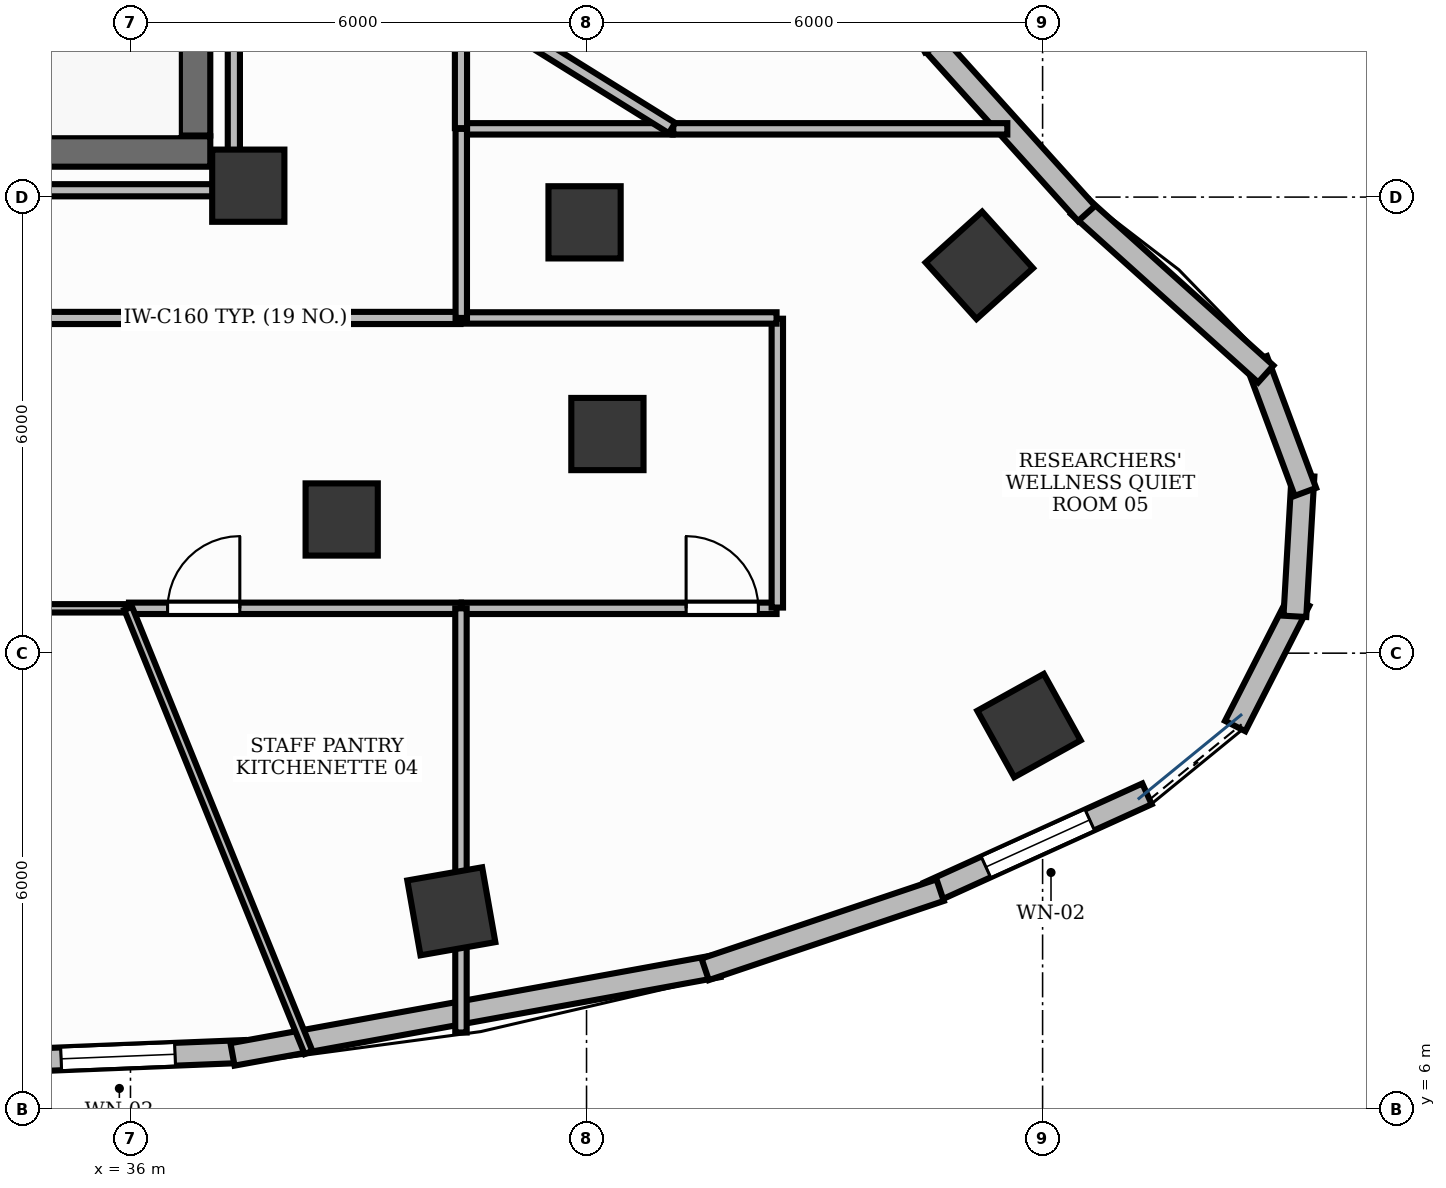
"""IFC4 building model, lengths in metres.
Left out: names, types, materials, properties, quantities, classifications, styles, units other than length and angle.
Written with IfcOpenShell. Run it as: python <this file> out.ifc"""

import sys

from ifc_helpers import new_model, si_unit, direction, frame, frame_2d, origin, origin_2d, place, context, subcontext, project, spatial, rectangle, extrude, element, fill, save


model = new_model("IFC4")
c1 = context("Model", 3, precision=1e-05, world=origin(), true_north=direction((0.0, 1.0)))
c2 = subcontext(c1, "Body", "Model", "MODEL_VIEW")
j1 = project(units=[si_unit("LENGTHUNIT", "METRE"), si_unit("PLANEANGLEUNIT", "RADIAN")], contexts=[c1])
p1 = place(None, origin())
s1 = spatial("IfcSite", under=j1, at=p1, CompositionType="ELEMENT")
p2 = place(p1, origin())
s2 = spatial("IfcBuilding", under=s1, at=p2, CompositionType="ELEMENT")
p3 = place(p2, frame((0.0, 0.0, 192.0)))
s3 = spatial("IfcBuildingStorey", under=s2, at=p3, CompositionType="ELEMENT", Elevation=192.0)
p4 = place(p3, frame((28.852, 18.6, 0.0), z_axis=(0.0, 0.0, 1.0), x_axis=(1.0, 0.0, 0.0)))
e1 = element("IfcWall", 1, at=p4, inside=s3, PredefinedType="SHEAR", context=c2, shape_type="SweptSolid", body=[
    extrude(rectangle(XDim=8.198, YDim=0.4, at=frame_2d((4.099, 0.0))), origin(), (0.0, 0.0, 1.0), 3.9),
])
p5 = place(p3, frame((36.85, 18.81, 0.0), z_axis=(0.0, 0.0, 1.0), x_axis=(0.0, 1.0, 0.0)))
e2 = element("IfcWall", 2, at=p5, inside=s3, PredefinedType="SHEAR", context=c2, shape_type="SweptSolid", body=[
    extrude(rectangle(XDim=3.08, YDim=0.4, at=frame_2d((1.54, 0.0))), origin(), (0.0, 0.0, 1.0), 3.9),
])
p6 = place(p3, frame((37.55, 18.15, -0.0), z_axis=(0.0, 0.0, 1.0), x_axis=(1.0, 0.0, 0.0)))
e3 = element("IfcColumn", 3, at=p6, inside=s3, PredefinedType="PILASTER", context=c2, shape_type="SweptSolid", body=[
    extrude(rectangle(XDim=0.95, YDim=0.95, at=origin_2d()), origin(), (0.0, 0.0, 1.0), 3.901),
])
p7 = place(p3, frame((40.221, 8.604, -0.0), z_axis=(0.0, 0.0, 1.0), x_axis=(0.984868307662, 0.173304404339, 0.0)))
e4 = element("IfcColumn", 4, at=p7, inside=s3, PredefinedType="COLUMN", context=c2, shape_type="SweptSolid", body=[
    extrude(rectangle(XDim=1.0, YDim=1.0, at=origin_2d()), origin(), (0.0, 0.0, 1.0), 3.901),
])
p8 = place(p3, frame((38.779, 13.759, -0.0), z_axis=(0.0, 0.0, 1.0), x_axis=(1.0, 0.0, 0.0)))
e5 = element("IfcColumn", 5, at=p8, inside=s3, PredefinedType="COLUMN", context=c2, shape_type="SweptSolid", body=[
    extrude(rectangle(XDim=0.95, YDim=0.95, at=origin_2d()), origin(), (0.0, 0.0, 1.0), 3.901),
])
p9 = place(p3, frame((47.821, 11.047, -0.0), z_axis=(0.0, 0.0, 1.0), x_axis=(0.874535078577, 0.484962262797, 0.0)))
e6 = element("IfcColumn", 6, at=p9, inside=s3, PredefinedType="COLUMN", context=c2, shape_type="SweptSolid", body=[
    extrude(rectangle(XDim=1.0, YDim=1.0, at=origin_2d()), origin(), (0.0, 0.0, 1.0), 3.901),
])
p10 = place(p3, frame((42.275, 14.883, -0.0), z_axis=(0.0, 0.0, 1.0), x_axis=(1.0, 0.0, 0.0)))
e7 = element("IfcColumn", 7, at=p10, inside=s3, PredefinedType="COLUMN", context=c2, shape_type="SweptSolid", body=[
    extrude(rectangle(XDim=0.95, YDim=0.95, at=origin_2d()), origin(), (0.0, 0.0, 1.0), 3.901),
])
p11 = place(p3, frame((47.167, 17.102, -0.0), z_axis=(0.0, 0.0, 1.0), x_axis=(-0.669130606359, 0.743144825477, 0.0)))
e8 = element("IfcColumn", 8, at=p11, inside=s3, PredefinedType="COLUMN", context=c2, shape_type="SweptSolid", body=[
    extrude(rectangle(XDim=1.0, YDim=1.0, at=origin_2d()), origin(), (0.0, 0.0, 1.0), 3.901),
])
p12 = place(p3, frame((41.974, 17.668, -0.0), z_axis=(0.0, 0.0, 1.0), x_axis=(1.0, 0.0, 0.0)))
e9 = element("IfcColumn", 9, at=p12, inside=s3, PredefinedType="COLUMN", context=c2, shape_type="SweptSolid", body=[
    extrude(rectangle(XDim=0.95, YDim=0.95, at=origin_2d()), origin(), (0.0, 0.0, 1.0), 3.901),
])
p13 = place(p3, frame((34.174, 6.626, 0.0), z_axis=(0.0, 0.0, 1.0), x_axis=(0.999191674443, 0.040199474165, 0.0)))
e10 = element("IfcWall", 10, at=p13, inside=s3, PredefinedType="STANDARD", context=c2, shape_type="SweptSolid", body=[
    extrude(rectangle(XDim=3.328, YDim=0.3, at=frame_2d((1.664, 0.0))), origin(), (0.0, 0.0, 1.0), 3.9),
])
p14 = place(p13, frame((0.914, 0.0, 0.95)))
e11 = element("IfcOpeningElement", 11, at=p14, cuts=e10, PredefinedType="OPENING", context=c2, shape_type="SweptSolid", body=[
    extrude(rectangle(XDim=1.5, YDim=1.8, at=frame_2d((0.75, 0.9))), frame((0.0, 0.165, 0.0), z_axis=(0.0, -1.0, 0.0), x_axis=(1.0, 0.0, 0.0)), (0.0, 0.0, 1.0), 0.33),
])
p15 = place(p3, frame((46.5, 8.845, 0.0), z_axis=(0.0, 0.0, 1.0), x_axis=(0.910644509231, 0.413190728124, 0.0)))
e12 = element("IfcWall", 12, at=p15, inside=s3, PredefinedType="STANDARD", context=c2, shape_type="SweptSolid", body=[
    extrude(rectangle(XDim=3.155, YDim=0.3, at=frame_2d((1.578, 0.0))), origin(), (0.0, 0.0, 1.0), 3.9),
])
p16 = place(p15, frame((0.828, 0.0, 0.95)))
e13 = element("IfcOpeningElement", 13, at=p16, cuts=e12, PredefinedType="OPENING", context=c2, shape_type="SweptSolid", body=[
    extrude(rectangle(XDim=1.5, YDim=1.8, at=frame_2d((0.75, 0.9))), frame((0.0, 0.165, 0.0), z_axis=(0.0, -1.0, 0.0), x_axis=(1.0, 0.0, 0.0)), (0.0, 0.0, 1.0), 0.33),
])
p17 = place(p3, frame((37.342, 6.721, 0.0), z_axis=(0.0, 0.0, 1.0), x_axis=(0.983808533342, 0.179222681945, 0.0)))
e14 = element("IfcWall", 14, at=p17, inside=s3, PredefinedType="STANDARD", context=c2, shape_type="SweptSolid", body=[
    extrude(rectangle(XDim=6.498, YDim=0.3, at=frame_2d((3.249, 0.0))), origin(), (0.0, 0.0, 1.0), 3.9),
])
p18 = place(p3, frame((43.561, 7.841, 0.0), z_axis=(0.0, 0.0, 1.0), x_axis=(0.947683163779, 0.319212501462, 0.0)))
e15 = element("IfcWall", 15, at=p18, inside=s3, PredefinedType="STANDARD", context=c2, shape_type="SweptSolid", body=[
    extrude(rectangle(XDim=3.262, YDim=0.3, at=frame_2d((1.631, 0.0))), origin(), (0.0, 0.0, 1.0), 3.9),
])
for number, where, z_axis, x_axis in (
    (16, (50.534, 11.041, 0.0), (0.0, 0.0, 1.0), (0.454, 0.891, 0.0)),
    (17, (51.319, 12.484, 0.0), (0.0, 0.0, 1.0), (0.057, 0.998, 0.0)),
    (18, (51.458, 14.121, 0.0), (0.0, 0.0, 1.0), (-0.349, 0.937, 0.0)),
):
    element("IfcWall", number, at=place(p3, frame(where, z_axis=z_axis, x_axis=x_axis)), inside=s3, PredefinedType="STANDARD", context=c2, shape_type="SweptSolid", body=[
        extrude(rectangle(XDim=1.852, YDim=0.3, at=frame_2d((0.926, 0.0))), origin(), (0.0, 0.0, 1.0), 3.9),
    ])
p19 = place(p3, frame((50.936, 15.673, 0.0), z_axis=(0.0, 0.0, 1.0), x_axis=(-0.743341827472, 0.668911748687, 0.0)))
e19 = element("IfcWall", 19, at=p19, inside=s3, PredefinedType="STANDARD", context=c2, shape_type="SweptSolid", body=[
    extrude(rectangle(XDim=3.31, YDim=0.3, at=frame_2d((1.655, 0.0))), origin(), (0.0, 0.0, 1.0), 3.9),
])
p20 = place(p3, frame((48.579, 17.784, 0.0), z_axis=(0.0, 0.0, 1.0), x_axis=(-0.669165704933, 0.743113221079, 0.0)))
e20 = element("IfcWall", 20, at=p20, inside=s3, PredefinedType="STANDARD", context=c2, shape_type="SweptSolid", body=[
    extrude(rectangle(XDim=3.087, YDim=0.3, at=frame_2d((1.543, 0.0))), origin(), (0.0, 0.0, 1.0), 3.9),
])
p21 = place(p3, frame((21.464, 12.59, 0.0), z_axis=(0.0, 0.0, 1.0), x_axis=(1.0, 0.0, 0.0)))
e21 = element("IfcWall", 21, at=p21, inside=s3, PredefinedType="MOVABLE", context=c2, shape_type="SweptSolid", body=[
    extrude(rectangle(XDim=14.505, YDim=0.11, at=frame_2d((7.252, 0.0))), origin(), (0.0, 0.0, 1.0), 2.91),
])
p22 = place(p21, frame((3.228, 0.0, 0.0)))
e22 = element("IfcOpeningElement", 22, at=p22, cuts=e21, PredefinedType="OPENING", context=c2, shape_type="SweptSolid", body=[
    extrude(rectangle(XDim=0.95, YDim=2.15, at=frame_2d((0.475, 1.075))), frame((0.0, 0.07, 0.0), z_axis=(0.0, -1.0, 0.0), x_axis=(1.0, 0.0, 0.0)), (0.0, 0.0, 1.0), 0.14),
])
p23 = place(p3, frame((35.98, 12.59, 0.0), z_axis=(0.0, 0.0, 1.0), x_axis=(1.0, 0.0, 0.0)))
e23 = element("IfcWall", 23, at=p23, inside=s3, PredefinedType="PARTITIONING", context=c2, shape_type="SweptSolid", body=[
    extrude(rectangle(XDim=4.368, YDim=0.15, at=frame_2d((2.184, 0.0))), origin(), (0.0, 0.0, 1.0), 2.91),
])
p24 = place(p23, frame((0.508, 0.0, 0.0)))
e24 = element("IfcOpeningElement", 24, at=p24, cuts=e23, PredefinedType="OPENING", context=c2, shape_type="SweptSolid", body=[
    extrude(rectangle(XDim=0.95, YDim=2.15, at=frame_2d((0.475, 1.075))), frame((0.0, 0.09, 0.0), z_axis=(0.0, -1.0, 0.0), x_axis=(1.0, 0.0, 0.0)), (0.0, 0.0, 1.0), 0.18),
])
p25 = place(p3, frame((40.358, 12.59, 0.0), z_axis=(0.0, 0.0, 1.0), x_axis=(1.0, 0.0, 0.0)))
e25 = element("IfcWall", 25, at=p25, inside=s3, PredefinedType="PARTITIONING", context=c2, shape_type="SweptSolid", body=[
    extrude(rectangle(XDim=4.142, YDim=0.15, at=frame_2d((2.071, 0.0))), origin(), (0.0, 0.0, 1.0), 2.91),
])
p26 = place(p25, frame((2.952, 0.0, 0.0)))
e26 = element("IfcOpeningElement", 26, at=p26, cuts=e25, PredefinedType="OPENING", context=c2, shape_type="SweptSolid", body=[
    extrude(rectangle(XDim=0.95, YDim=2.15, at=frame_2d((0.475, 1.075))), frame((0.0, 0.09, 0.0), z_axis=(0.0, -1.0, 0.0), x_axis=(1.0, 0.0, 0.0)), (0.0, 0.0, 1.0), 0.18),
])
p27 = place(p3, frame((40.342, 16.41, 0.0), z_axis=(0.0, 0.0, 1.0), x_axis=(-1.0, 0.0, 0.0)))
e27 = element("IfcWall", 27, at=p27, inside=s3, PredefinedType="PARTITIONING", context=c2, shape_type="SweptSolid", body=[
    extrude(rectangle(XDim=11.342, YDim=0.16, at=frame_2d((5.671, 0.0))), origin(), (0.0, 0.0, 1.0), 2.91),
])
p28 = place(p27, frame((6.14, 0.0, 0.0)))
e28 = element("IfcOpeningElement", 28, at=p28, cuts=e27, PredefinedType="OPENING", context=c2, shape_type="SweptSolid", body=[
    extrude(rectangle(XDim=0.95, YDim=2.15, at=frame_2d((0.475, 1.075))), frame((0.0, 0.095, 0.0), z_axis=(0.0, -1.0, 0.0), x_axis=(1.0, 0.0, 0.0)), (0.0, 0.0, 1.0), 0.19),
])
p29 = place(p3, frame((35.969, 12.59, 0.0), z_axis=(0.0, 0.0, 1.0), x_axis=(0.376224407508, -0.92652857225, 0.0)))
e29 = element("IfcWall", 29, at=p29, inside=s3, PredefinedType="MOVABLE", context=c2, shape_type="SweptSolid", body=[
    extrude(rectangle(XDim=6.307, YDim=0.11, at=frame_2d((3.153, 0.0))), origin(), (0.0, 0.0, 1.0), 2.91),
])
p30 = place(p3, frame((40.348, 12.59, 0.0), z_axis=(0.0, 0.0, 1.0), x_axis=(0.0, -1.0, 0.0)))
e30 = element("IfcWall", 30, at=p30, inside=s3, PredefinedType="PARTITIONING", context=c2, shape_type="SweptSolid", body=[
    extrude(rectangle(XDim=5.581, YDim=0.15, at=frame_2d((2.791, 0.0))), origin(), (0.0, 0.0, 1.0), 2.91),
])
p31 = place(p3, frame((40.352, 18.898, 0.0), z_axis=(0.0, 0.0, 1.0), x_axis=(1.0, 0.0, 0.0)))
e31 = element("IfcWall", 31, at=p31, inside=s3, PredefinedType="PARTITIONING", context=c2, shape_type="SweptSolid", body=[
    extrude(rectangle(XDim=2.781, YDim=0.15, at=frame_2d((1.39, 0.0))), origin(), (0.0, 0.0, 1.0), 2.91),
])
p32 = place(p3, frame((43.141, 18.898, 0.0), z_axis=(0.0, 0.0, 1.0), x_axis=(1.0, 0.0, 0.0)))
e32 = element("IfcWall", 32, at=p32, inside=s3, PredefinedType="PARTITIONING", context=c2, shape_type="SweptSolid", body=[
    extrude(rectangle(XDim=4.395, YDim=0.15, at=frame_2d((2.198, 0.0))), origin(), (0.0, 0.0, 1.0), 2.91),
])
p33 = place(p3, frame((44.51, 12.6, 0.0), z_axis=(0.0, 0.0, 1.0), x_axis=(0.0, 1.0, 0.0)))
e33 = element("IfcWall", 33, at=p33, inside=s3, PredefinedType="PARTITIONING", context=c2, shape_type="SweptSolid", body=[
    extrude(rectangle(XDim=3.8, YDim=0.15, at=frame_2d((1.9, 0.0))), origin(), (0.0, 0.0, 1.0), 2.91),
])
p34 = place(p3, frame((44.5, 16.41, 0.0), z_axis=(0.0, 0.0, 1.0), x_axis=(-1.0, 0.0, 0.0)))
e34 = element("IfcWall", 34, at=p34, inside=s3, PredefinedType="PARTITIONING", context=c2, shape_type="SweptSolid", body=[
    extrude(rectangle(XDim=4.148, YDim=0.15, at=frame_2d((2.074, 0.0))), origin(), (0.0, 0.0, 1.0), 2.91),
])
p35 = place(p3, frame((40.352, 16.41, 0.0), z_axis=(0.0, 0.0, 1.0), x_axis=(0.0, 1.0, 0.0)))
e35 = element("IfcWall", 35, at=p35, inside=s3, PredefinedType="PARTITIONING", context=c2, shape_type="SweptSolid", body=[
    extrude(rectangle(XDim=2.488, YDim=0.15, at=frame_2d((1.244, 0.0))), origin(), (0.0, 0.0, 1.0), 2.91),
])
p36 = place(p3, frame((29.0, 18.09, 0.0), z_axis=(0.0, 0.0, 1.0), x_axis=(1.0, 0.0, 0.0)))
e36 = element("IfcWall", 36, at=p36, inside=s3, PredefinedType="PARTITIONING", context=c2, shape_type="SweptSolid", body=[
    extrude(rectangle(XDim=8.35, YDim=0.16, at=frame_2d((4.175, 0.0))), origin(), (0.0, 0.0, 1.0), 2.91),
])
p37 = place(p3, frame((37.36, 18.1, 0.0), z_axis=(0.0, 0.0, 1.0), x_axis=(0.0, 1.0, 0.0)))
e37 = element("IfcWall", 37, at=p37, inside=s3, PredefinedType="PARTITIONING", context=c2, shape_type="SweptSolid", body=[
    extrude(rectangle(XDim=10.694, YDim=0.16, at=frame_2d((5.347, 0.0))), origin(), (0.0, 0.0, 1.0), 2.91),
])
p38 = place(p3, frame((43.125, 18.908, 0.0), z_axis=(0.0, 0.0, 1.0), x_axis=(-0.848988734201, 0.528410947274, 0.0)))
e38 = element("IfcWall", 38, at=p38, inside=s3, PredefinedType="PARTITIONING", context=c2, shape_type="SweptSolid", body=[
    extrude(rectangle(XDim=3.263, YDim=0.16, at=frame_2d((1.632, 0.0))), origin(), (0.0, 0.0, 1.0), 2.91),
])
p39 = place(p3, frame((40.348, 20.629, 0.0), z_axis=(0.0, 0.0, 1.0), x_axis=(0.0, -1.0, 0.0)))
e39 = element("IfcWall", 39, at=p39, inside=s3, PredefinedType="PARTITIONING", context=c2, shape_type="SweptSolid", body=[
    extrude(rectangle(XDim=1.722, YDim=0.16, at=frame_2d((0.861, 0.0))), origin(), (0.0, 0.0, 1.0), 2.91),
])
p40 = place(p14, origin())
e40 = element("IfcWindow", 40, at=p40, inside=s3, PartitioningType="DOUBLE_PANEL_VERTICAL", PredefinedType="WINDOW", context=c2, shape_type="SweptSolid", body=[
    extrude(rectangle(XDim=1.5, YDim=1.8, at=frame_2d((0.75, 0.9))), frame((0.0, 0.03, 0.0), z_axis=(0.0, -1.0, 0.0), x_axis=(1.0, 0.0, 0.0)), (0.0, 0.0, 1.0), 0.06),
])
fill(e11, e40)
p41 = place(p16, origin())
e41 = element("IfcWindow", 41, at=p41, inside=s3, PartitioningType="DOUBLE_PANEL_VERTICAL", PredefinedType="WINDOW", context=c2, shape_type="SweptSolid", body=[
    extrude(rectangle(XDim=1.5, YDim=1.8, at=frame_2d((0.75, 0.9))), frame((0.0, 0.03, 0.0), z_axis=(0.0, -1.0, 0.0), x_axis=(1.0, 0.0, 0.0)), (0.0, 0.0, 1.0), 0.06),
])
fill(e13, e41)
p42 = place(p24, origin())
e42 = element("IfcDoor", 42, at=p42, inside=s3, OperationType="SINGLE_SWING_RIGHT", PredefinedType="DOOR", context=c2, shape_type="SweptSolid", body=[
    extrude(rectangle(XDim=0.95, YDim=2.15, at=frame_2d((0.475, 1.075))), frame((0.0, 0.025, 0.0), z_axis=(0.0, -1.0, 0.0), x_axis=(1.0, 0.0, 0.0)), (0.0, 0.0, 1.0), 0.05),
])
fill(e24, e42)
p43 = place(p26, origin())
e43 = element("IfcDoor", 43, at=p43, inside=s3, OperationType="SINGLE_SWING_LEFT", PredefinedType="DOOR", context=c2, shape_type="SweptSolid", body=[
    extrude(rectangle(XDim=0.95, YDim=2.15, at=frame_2d((0.475, 1.075))), frame((0.0, 0.025, 0.0), z_axis=(0.0, -1.0, 0.0), x_axis=(1.0, 0.0, 0.0)), (0.0, 0.0, 1.0), 0.05),
])
fill(e26, e43)
save(model, sys.argv[1])
